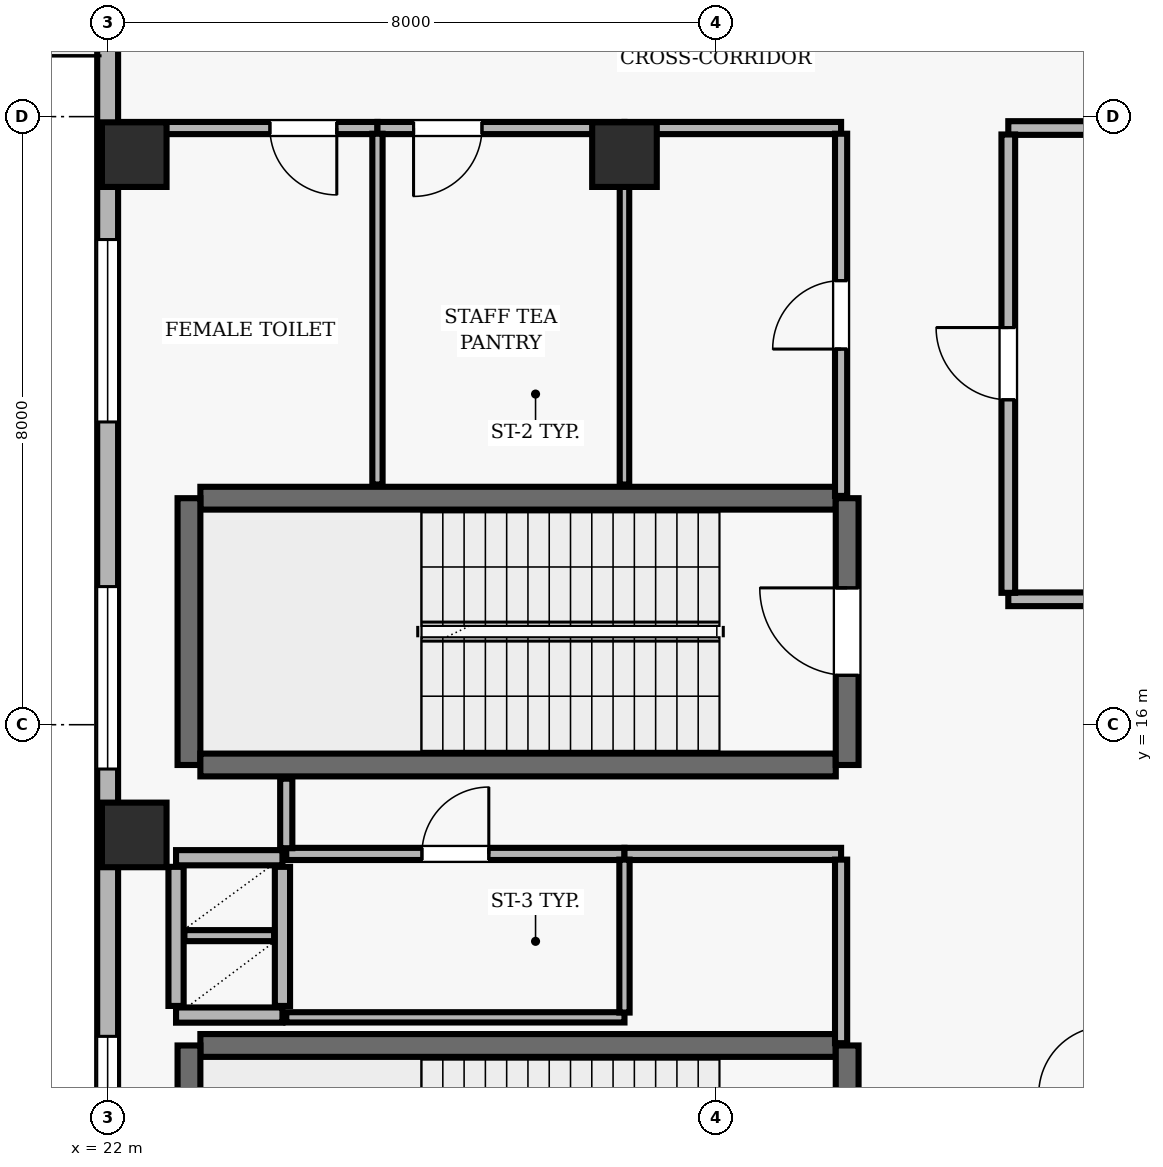
"""IFC4 building model, lengths in metres.
Left out: names, types, materials, properties, quantities, classifications, styles, units other than length and angle.
Written with IfcOpenShell. Run it as: python <this file> out.ifc"""

import sys

from ifc_helpers import new_model, si_unit, direction, frame, frame_2d, origin, origin_2d, place, context, subcontext, project, spatial, rectangle, extrude, element, fill, save


model = new_model("IFC4")
c1 = context("Model", 3, precision=1e-05, world=origin(), true_north=direction((0.0, 1.0)))
c2 = subcontext(c1, "Body", "Model", "MODEL_VIEW")
j1 = project(units=[si_unit("LENGTHUNIT", "METRE"), si_unit("PLANEANGLEUNIT", "RADIAN")], contexts=[c1])
p1 = place(None, origin())
s1 = spatial("IfcSite", under=j1, at=p1, CompositionType="ELEMENT")
p2 = place(p1, origin())
s2 = spatial("IfcBuilding", under=s1, at=p2, CompositionType="ELEMENT")
p3 = place(p2, frame((0.0, 0.0, 311.7)))
s3 = spatial("IfcBuildingStorey", under=s2, at=p3, CompositionType="ELEMENT", Elevation=311.7)
for number, where, z_axis, x_axis in (
    (1, (22.35, 14.55, 0.0), (0.0, 0.0, 1.0), (1.0, 0.0, 0.0)),
    (2, (22.35, 23.5, 0.0), (0.0, 0.0, 1.0), (1.0, 0.0, 0.0)),
    (3, (28.8, 23.5, 0.0), (0.0, 0.0, 1.0), (1.0, 0.0, 0.0)),
):
    element("IfcColumn", number, at=place(p3, frame(where, z_axis=z_axis, x_axis=x_axis)), inside=s3, PredefinedType="COLUMN", context=c2, shape_type="SweptSolid", body=[
        extrude(rectangle(XDim=0.85, YDim=0.85, at=origin_2d()), origin(), (0.0, 0.0, 1.0), 5.0),
    ])
p4 = place(p3, frame((22.0, 35.3, 0.0), z_axis=(0.0, 0.0, 1.0), x_axis=(0.0, -1.0, 0.0)))
e4 = element("IfcWall", 4, at=p4, inside=s3, PredefinedType="SOLIDWALL", context=c2, shape_type="SweptSolid", body=[
    extrude(rectangle(XDim=32.8, YDim=0.275, at=frame_2d((16.4, 0.0))), origin(), (0.0, 0.0, 1.0), 4.74),
])
p5 = place(p4, frame((7.3, 0.0, 0.0)))
e5 = element("IfcOpeningElement", 5, at=p5, cuts=e4, PredefinedType="OPENING", context=c2, shape_type="SweptSolid", body=[
    extrude(rectangle(XDim=1.0, YDim=2.2, at=frame_2d((0.5, 1.1))), frame((0.0, 0.147, 0.0), z_axis=(0.0, -1.0, 0.0), x_axis=(1.0, 0.0, 0.0)), (0.0, 0.0, 1.0), 0.295),
])
p6 = place(p4, frame((1.533, 0.0, 0.9)))
e6 = element("IfcOpeningElement", 6, at=p6, cuts=e4, PredefinedType="OPENING", context=c2, shape_type="SweptSolid", body=[
    extrude(rectangle(XDim=2.4, YDim=1.6, at=frame_2d((1.2, 0.8))), frame((0.0, 0.147, 0.0), z_axis=(0.0, -1.0, 0.0), x_axis=(1.0, 0.0, 0.0)), (0.0, 0.0, 1.0), 0.295),
])
p7 = place(p4, frame((12.917, 0.0, 0.9)))
e7 = element("IfcOpeningElement", 7, at=p7, cuts=e4, PredefinedType="OPENING", context=c2, shape_type="SweptSolid", body=[
    extrude(rectangle(XDim=2.4, YDim=1.6, at=frame_2d((1.2, 0.8))), frame((0.0, 0.147, 0.0), z_axis=(0.0, -1.0, 0.0), x_axis=(1.0, 0.0, 0.0)), (0.0, 0.0, 1.0), 0.295),
])
p8 = place(p4, frame((17.483, 0.0, 0.9)))
e8 = element("IfcOpeningElement", 8, at=p8, cuts=e4, PredefinedType="OPENING", context=c2, shape_type="SweptSolid", body=[
    extrude(rectangle(XDim=2.4, YDim=1.6, at=frame_2d((1.2, 0.8))), frame((0.0, 0.147, 0.0), z_axis=(0.0, -1.0, 0.0), x_axis=(1.0, 0.0, 0.0)), (0.0, 0.0, 1.0), 0.295),
])
p9 = place(p4, frame((23.4, 0.0, 0.9)))
e9 = element("IfcOpeningElement", 9, at=p9, cuts=e4, PredefinedType="OPENING", context=c2, shape_type="SweptSolid", body=[
    extrude(rectangle(XDim=2.4, YDim=1.6, at=frame_2d((1.2, 0.8))), frame((0.0, 0.147, 0.0), z_axis=(0.0, -1.0, 0.0), x_axis=(1.0, 0.0, 0.0)), (0.0, 0.0, 1.0), 0.295),
])
p10 = place(p3, frame((31.58, 18.98, 0.0), z_axis=(0.0, 0.0, 1.0), x_axis=(-1.0, 0.0, 0.0)))
e10 = element("IfcWall", 10, at=p10, inside=s3, PredefinedType="SHEAR", context=c2, shape_type="SweptSolid", body=[
    extrude(rectangle(XDim=8.36, YDim=0.3, at=frame_2d((4.18, 0.0))), origin(), (0.0, 0.0, 1.0), 4.74),
])
p11 = place(p3, frame((23.07, 18.98, 0.0), z_axis=(0.0, 0.0, 1.0), x_axis=(0.0, -1.0, 0.0)))
e11 = element("IfcWall", 11, at=p11, inside=s3, PredefinedType="SHEAR", context=c2, shape_type="SweptSolid", body=[
    extrude(rectangle(XDim=3.51, YDim=0.3, at=frame_2d((1.755, 0.0))), origin(), (0.0, 0.0, 1.0), 4.74),
])
p12 = place(p3, frame((23.22, 15.47, 0.0), z_axis=(0.0, 0.0, 1.0), x_axis=(1.0, 0.0, 0.0)))
e12 = element("IfcWall", 12, at=p12, inside=s3, PredefinedType="SHEAR", context=c2, shape_type="SweptSolid", body=[
    extrude(rectangle(XDim=8.36, YDim=0.3, at=frame_2d((4.18, 0.0))), origin(), (0.0, 0.0, 1.0), 4.74),
])
p13 = place(p3, frame((31.73, 15.47, 0.0), z_axis=(0.0, 0.0, 1.0), x_axis=(0.0, 1.0, 0.0)))
e13 = element("IfcWall", 13, at=p13, inside=s3, PredefinedType="SHEAR", context=c2, shape_type="SweptSolid", body=[
    extrude(rectangle(XDim=3.51, YDim=0.3, at=frame_2d((1.755, 0.0))), origin(), (0.0, 0.0, 1.0), 4.74),
])
p14 = place(p13, frame((1.18, 0.0, 0.0)))
e14 = element("IfcOpeningElement", 14, at=p14, cuts=e13, PredefinedType="OPENING", context=c2, shape_type="SweptSolid", body=[
    extrude(rectangle(XDim=1.15, YDim=2.15, at=frame_2d((0.575, 1.075))), frame((0.0, 0.16, 0.0), z_axis=(0.0, -1.0, 0.0), x_axis=(1.0, 0.0, 0.0)), (0.0, 0.0, 1.0), 0.32),
])
p15 = place(p3, frame((31.58, 11.78, 0.0), z_axis=(0.0, 0.0, 1.0), x_axis=(-1.0, 0.0, 0.0)))
e15 = element("IfcWall", 15, at=p15, inside=s3, PredefinedType="SHEAR", context=c2, shape_type="SweptSolid", body=[
    extrude(rectangle(XDim=8.36, YDim=0.3, at=frame_2d((4.18, 0.0))), origin(), (0.0, 0.0, 1.0), 4.74),
])
p16 = place(p3, frame((23.07, 11.78, 0.0), z_axis=(0.0, 0.0, 1.0), x_axis=(0.0, -1.0, 0.0)))
e16 = element("IfcWall", 16, at=p16, inside=s3, PredefinedType="SHEAR", context=c2, shape_type="SweptSolid", body=[
    extrude(rectangle(XDim=3.51, YDim=0.3, at=frame_2d((1.755, 0.0))), origin(), (0.0, 0.0, 1.0), 4.74),
])
p17 = place(p3, frame((31.73, 8.27, 0.0), z_axis=(0.0, 0.0, 1.0), x_axis=(0.0, 1.0, 0.0)))
e17 = element("IfcWall", 17, at=p17, inside=s3, PredefinedType="SHEAR", context=c2, shape_type="SweptSolid", body=[
    extrude(rectangle(XDim=3.51, YDim=0.3, at=frame_2d((1.755, 0.0))), origin(), (0.0, 0.0, 1.0), 4.74),
])
p18 = place(p17, frame((1.18, 0.0, 0.0)))
e18 = element("IfcOpeningElement", 18, at=p18, cuts=e17, PredefinedType="OPENING", context=c2, shape_type="SweptSolid", body=[
    extrude(rectangle(XDim=1.15, YDim=2.15, at=frame_2d((0.575, 1.075))), frame((0.0, 0.16, 0.0), z_axis=(0.0, -1.0, 0.0), x_axis=(1.0, 0.0, 0.0)), (0.0, 0.0, 1.0), 0.32),
])
for number, where, z_axis, x_axis in (
    (19, (22.9, 14.25, 0.0), (0.0, 0.0, 1.0), (1.0, 0.0, 0.0)),
    (20, (22.9, 12.18, 0.0), (0.0, 0.0, 1.0), (1.0, 0.0, 0.0)),
):
    element("IfcWall", number, at=place(p3, frame(where, z_axis=z_axis, x_axis=x_axis)), inside=s3, PredefinedType="SOLIDWALL", context=c2, shape_type="SweptSolid", body=[
        extrude(rectangle(XDim=1.4, YDim=0.2, at=frame_2d((0.7, 0.0))), origin(), (0.0, 0.0, 1.0), 4.74),
    ])
for number, where, z_axis, x_axis in (
    (21, (24.3, 12.3, 0.0), (0.0, 0.0, 1.0), (0.0, 1.0, 0.0)),
    (22, (22.9, 12.3, 0.0), (0.0, 0.0, 1.0), (0.0, 1.0, 0.0)),
):
    element("IfcWall", number, at=place(p3, frame(where, z_axis=z_axis, x_axis=x_axis)), inside=s3, PredefinedType="SOLIDWALL", context=c2, shape_type="SweptSolid", body=[
        extrude(rectangle(XDim=1.83, YDim=0.2, at=frame_2d((0.915, 0.0))), origin(), (0.0, 0.0, 1.0), 4.74),
    ])
p19 = place(p3, frame((23.01, 13.225, 0.0), z_axis=(0.0, 0.0, 1.0), x_axis=(1.0, 0.0, 0.0)))
e23 = element("IfcWall", 23, at=p19, inside=s3, PredefinedType="PARTITIONING", context=c2, shape_type="SweptSolid", body=[
    extrude(rectangle(XDim=1.18, YDim=0.145, at=frame_2d((0.59, 0.0))), origin(), (0.0, 0.0, 1.0), 4.422),
])
p20 = place(p3, frame((24.35, 12.15, 0.0), z_axis=(0.0, 0.0, 1.0), x_axis=(1.0, 0.0, 0.0)))
e24 = element("IfcWall", 24, at=p20, inside=s3, PredefinedType="PARTITIONING", context=c2, shape_type="SweptSolid", body=[
    extrude(rectangle(XDim=4.45, YDim=0.135, at=frame_2d((2.225, 0.0))), origin(), (0.0, 0.0, 1.0), 4.74),
])
p21 = place(p3, frame((24.35, 14.3, 0.0), z_axis=(0.0, 0.0, 1.0), x_axis=(1.0, 0.0, 0.0)))
e25 = element("IfcWall", 25, at=p21, inside=s3, PredefinedType="PARTITIONING", context=c2, shape_type="SweptSolid", body=[
    extrude(rectangle(XDim=4.45, YDim=0.16, at=frame_2d((2.225, 0.0))), origin(), (0.0, 0.0, 1.0), 4.74),
])
p22 = place(p21, frame((1.785, 0.0, 0.0)))
e26 = element("IfcOpeningElement", 26, at=p22, cuts=e25, PredefinedType="OPENING", context=c2, shape_type="SweptSolid", body=[
    extrude(rectangle(XDim=0.88, YDim=2.1, at=frame_2d((0.44, 1.05))), frame((0.0, 0.09, 0.0), z_axis=(0.0, -1.0, 0.0), x_axis=(1.0, 0.0, 0.0)), (0.0, 0.0, 1.0), 0.18),
])
p23 = place(p3, frame((25.55, 23.85, 0.0), z_axis=(0.0, 0.0, 1.0), x_axis=(-1.0, 0.0, 0.0)))
e27 = element("IfcWall", 27, at=p23, inside=s3, PredefinedType="PARTITIONING", context=c2, shape_type="SweptSolid", body=[
    extrude(rectangle(XDim=3.35, YDim=0.16, at=frame_2d((1.675, 0.0))), origin(), (0.0, 0.0, 1.0), 4.271),
])
p24 = place(p23, frame((0.535, 0.0, 0.0)))
e28 = element("IfcOpeningElement", 28, at=p24, cuts=e27, PredefinedType="OPENING", context=c2, shape_type="SweptSolid", body=[
    extrude(rectangle(XDim=0.88, YDim=2.1, at=frame_2d((0.44, 1.05))), frame((0.0, 0.09, 0.0), z_axis=(0.0, -1.0, 0.0), x_axis=(1.0, 0.0, 0.0)), (0.0, 0.0, 1.0), 0.18),
])
p25 = place(p3, frame((28.8, 14.3, 0.0), z_axis=(0.0, 0.0, 1.0), x_axis=(1.0, 0.0, 0.0)))
e29 = element("IfcWall", 29, at=p25, inside=s3, PredefinedType="PARTITIONING", context=c2, shape_type="SweptSolid", body=[
    extrude(rectangle(XDim=2.85, YDim=0.16, at=frame_2d((1.425, 0.0))), origin(), (0.0, 0.0, 1.0), 4.74),
])
p26 = place(p3, frame((28.8, 23.85, 0.0), z_axis=(0.0, 0.0, 1.0), x_axis=(-1.0, 0.0, 0.0)))
e30 = element("IfcWall", 30, at=p26, inside=s3, PredefinedType="PARTITIONING", context=c2, shape_type="SweptSolid", body=[
    extrude(rectangle(XDim=3.25, YDim=0.16, at=frame_2d((1.625, 0.0))), origin(), (0.0, 0.0, 1.0), 4.271),
])
p27 = place(p26, frame((1.875, 0.0, 0.0)))
e31 = element("IfcOpeningElement", 31, at=p27, cuts=e30, PredefinedType="OPENING", context=c2, shape_type="SweptSolid", body=[
    extrude(rectangle(XDim=0.9, YDim=2.1, at=frame_2d((0.45, 1.05))), frame((0.0, 0.09, 0.0), z_axis=(0.0, -1.0, 0.0), x_axis=(1.0, 0.0, 0.0)), (0.0, 0.0, 1.0), 0.18),
])
p28 = place(p3, frame((31.65, 23.85, 0.0), z_axis=(0.0, 0.0, 1.0), x_axis=(-1.0, 0.0, 0.0)))
e32 = element("IfcWall", 32, at=p28, inside=s3, PredefinedType="PARTITIONING", context=c2, shape_type="SweptSolid", body=[
    extrude(rectangle(XDim=2.85, YDim=0.16, at=frame_2d((1.425, 0.0))), origin(), (0.0, 0.0, 1.0), 4.271),
])
p29 = place(p3, frame((33.85, 17.65, 0.0), z_axis=(0.0, 0.0, 1.0), x_axis=(1.0, 0.0, 0.0)))
e33 = element("IfcWall", 33, at=p29, inside=s3, PredefinedType="PARTITIONING", context=c2, shape_type="SweptSolid", body=[
    extrude(rectangle(XDim=1.3, YDim=0.18, at=frame_2d((0.65, 0.0))), origin(), (0.0, 0.0, 1.0), 4.74),
])
p30 = place(p3, frame((37.85, 23.85, 0.0), z_axis=(0.0, 0.0, 1.0), x_axis=(-1.0, 0.0, 0.0)))
e34 = element("IfcWall", 34, at=p30, inside=s3, PredefinedType="PARTITIONING", context=c2, shape_type="SweptSolid", body=[
    extrude(rectangle(XDim=4.0, YDim=0.18, at=frame_2d((2.0, 0.0))), origin(), (0.0, 0.0, 1.0), 4.271),
])
p31 = place(p3, frame((24.35, 15.29, 0.0), z_axis=(0.0, 0.0, 1.0), x_axis=(0.0, -1.0, 0.0)))
e35 = element("IfcWall", 35, at=p31, inside=s3, PredefinedType="PARTITIONING", context=c2, shape_type="SweptSolid", body=[
    extrude(rectangle(XDim=0.915, YDim=0.16, at=frame_2d((0.458, 0.0))), origin(), (0.0, 0.0, 1.0), 4.74),
])
p32 = place(p3, frame((25.55, 19.16, 0.0), z_axis=(0.0, 0.0, 1.0), x_axis=(0.0, 1.0, 0.0)))
e36 = element("IfcWall", 36, at=p32, inside=s3, PredefinedType="PARTITIONING", context=c2, shape_type="SweptSolid", body=[
    extrude(rectangle(XDim=4.615, YDim=0.135, at=frame_2d((2.308, 0.0))), origin(), (0.0, 0.0, 1.0), 4.74),
])
p33 = place(p3, frame((28.8, 12.213, 0.0), z_axis=(0.0, 0.0, 1.0), x_axis=(0.0, 1.0, 0.0)))
e37 = element("IfcWall", 37, at=p33, inside=s3, PredefinedType="PARTITIONING", context=c2, shape_type="SweptSolid", body=[
    extrude(rectangle(XDim=2.012, YDim=0.135, at=frame_2d((1.006, 0.0))), origin(), (0.0, 0.0, 1.0), 4.74),
])
p34 = place(p3, frame((28.8, 23.775, 0.0), z_axis=(0.0, 0.0, 1.0), x_axis=(0.0, -1.0, 0.0)))
e38 = element("IfcWall", 38, at=p34, inside=s3, PredefinedType="PARTITIONING", context=c2, shape_type="SweptSolid", body=[
    extrude(rectangle(XDim=4.615, YDim=0.125, at=frame_2d((2.308, 0.0))), origin(), (0.0, 0.0, 1.0), 4.74),
])
p35 = place(p3, frame((31.65, 14.225, 0.0), z_axis=(0.0, 0.0, 1.0), x_axis=(0.0, -1.0, 0.0)))
e39 = element("IfcWall", 39, at=p35, inside=s3, PredefinedType="PARTITIONING", context=c2, shape_type="SweptSolid", body=[
    extrude(rectangle(XDim=2.415, YDim=0.16, at=frame_2d((1.208, 0.0))), origin(), (0.0, 0.0, 1.0), 4.74),
])
p36 = place(p3, frame((31.65, 19.01, 0.0), z_axis=(0.0, 0.0, 1.0), x_axis=(0.0, 1.0, 0.0)))
e40 = element("IfcWall", 40, at=p36, inside=s3, PredefinedType="PARTITIONING", context=c2, shape_type="SweptSolid", body=[
    extrude(rectangle(XDim=4.765, YDim=0.16, at=frame_2d((2.382, 0.0))), origin(), (0.0, 0.0, 1.0), 4.74),
])
p37 = place(p36, frame((1.932, 0.0, 0.0)))
e41 = element("IfcOpeningElement", 41, at=p37, cuts=e40, PredefinedType="OPENING", context=c2, shape_type="SweptSolid", body=[
    extrude(rectangle(XDim=0.9, YDim=2.1, at=frame_2d((0.45, 1.05))), frame((0.0, 0.09, 0.0), z_axis=(0.0, -1.0, 0.0), x_axis=(1.0, 0.0, 0.0)), (0.0, 0.0, 1.0), 0.18),
])
p38 = place(p3, frame((33.85, 17.735, 0.0), z_axis=(0.0, 0.0, 1.0), x_axis=(0.0, 1.0, 0.0)))
e42 = element("IfcWall", 42, at=p38, inside=s3, PredefinedType="PARTITIONING", context=c2, shape_type="SweptSolid", body=[
    extrude(rectangle(XDim=6.03, YDim=0.18, at=frame_2d((3.015, 0.0))), origin(), (0.0, 0.0, 1.0), 4.74),
])
p39 = place(p38, frame((2.54, 0.0, 0.0)))
e43 = element("IfcOpeningElement", 43, at=p39, cuts=e42, PredefinedType="OPENING", context=c2, shape_type="SweptSolid", body=[
    extrude(rectangle(XDim=0.95, YDim=2.1, at=frame_2d((0.475, 1.05))), frame((0.0, 0.1, 0.0), z_axis=(0.0, -1.0, 0.0), x_axis=(1.0, 0.0, 0.0)), (0.0, 0.0, 1.0), 0.2),
])
p40 = place(p7, origin())
e44 = element("IfcWindow", 44, at=p40, inside=s3, PartitioningType="SINGLE_PANEL", PredefinedType="WINDOW", context=c2, shape_type="SweptSolid", body=[
    extrude(rectangle(XDim=2.4, YDim=1.6, at=frame_2d((1.2, 0.8))), frame((0.0, 0.03, 0.0), z_axis=(0.0, -1.0, 0.0), x_axis=(1.0, 0.0, 0.0)), (0.0, 0.0, 1.0), 0.06),
])
fill(e7, e44)
p41 = place(p8, origin())
e45 = element("IfcWindow", 45, at=p41, inside=s3, PartitioningType="SINGLE_PANEL", PredefinedType="WINDOW", context=c2, shape_type="SweptSolid", body=[
    extrude(rectangle(XDim=2.4, YDim=1.6, at=frame_2d((1.2, 0.8))), frame((0.0, 0.03, 0.0), z_axis=(0.0, -1.0, 0.0), x_axis=(1.0, 0.0, 0.0)), (0.0, 0.0, 1.0), 0.06),
])
fill(e8, e45)
p42 = place(p9, origin())
e46 = element("IfcWindow", 46, at=p42, inside=s3, PartitioningType="SINGLE_PANEL", PredefinedType="WINDOW", context=c2, shape_type="SweptSolid", body=[
    extrude(rectangle(XDim=2.4, YDim=1.6, at=frame_2d((1.2, 0.8))), frame((0.0, 0.03, 0.0), z_axis=(0.0, -1.0, 0.0), x_axis=(1.0, 0.0, 0.0)), (0.0, 0.0, 1.0), 0.06),
])
fill(e9, e46)
p43 = place(p14, origin())
e47 = element("IfcDoor", 47, at=p43, inside=s3, OperationType="SINGLE_SWING_RIGHT", PredefinedType="DOOR", context=c2, shape_type="SweptSolid", body=[
    extrude(rectangle(XDim=1.15, YDim=2.15, at=frame_2d((0.575, 1.075))), frame((0.0, 0.025, 0.0), z_axis=(0.0, -1.0, 0.0), x_axis=(1.0, 0.0, 0.0)), (0.0, 0.0, 1.0), 0.05),
])
fill(e14, e47)
p44 = place(p39, origin())
e48 = element("IfcDoor", 48, at=p44, inside=s3, OperationType="SINGLE_SWING_RIGHT", PredefinedType="DOOR", context=c2, shape_type="SweptSolid", body=[
    extrude(rectangle(XDim=0.95, YDim=2.1, at=frame_2d((0.475, 1.05))), frame((0.0, 0.025, 0.0), z_axis=(0.0, -1.0, 0.0), x_axis=(1.0, 0.0, 0.0)), (0.0, 0.0, 1.0), 0.05),
])
fill(e43, e48)
p45 = place(p37, origin())
e49 = element("IfcDoor", 49, at=p45, inside=s3, OperationType="SINGLE_SWING_LEFT", PredefinedType="DOOR", context=c2, shape_type="SweptSolid", body=[
    extrude(rectangle(XDim=0.9, YDim=2.1, at=frame_2d((0.45, 1.05))), frame((0.0, 0.025, 0.0), z_axis=(0.0, -1.0, 0.0), x_axis=(1.0, 0.0, 0.0)), (0.0, 0.0, 1.0), 0.05),
])
fill(e41, e49)
p46 = place(p22, origin())
e50 = element("IfcDoor", 50, at=p46, inside=s3, OperationType="SINGLE_SWING_RIGHT", PredefinedType="DOOR", context=c2, shape_type="SweptSolid", body=[
    extrude(rectangle(XDim=0.88, YDim=2.1, at=frame_2d((0.44, 1.05))), frame((0.0, 0.025, 0.0), z_axis=(0.0, -1.0, 0.0), x_axis=(1.0, 0.0, 0.0)), (0.0, 0.0, 1.0), 0.05),
])
fill(e26, e50)
p47 = place(p24, origin())
e51 = element("IfcDoor", 51, at=p47, inside=s3, OperationType="SINGLE_SWING_LEFT", PredefinedType="DOOR", context=c2, shape_type="SweptSolid", body=[
    extrude(rectangle(XDim=0.88, YDim=2.1, at=frame_2d((0.44, 1.05))), frame((0.0, 0.025, 0.0), z_axis=(0.0, -1.0, 0.0), x_axis=(1.0, 0.0, 0.0)), (0.0, 0.0, 1.0), 0.05),
])
fill(e28, e51)
p48 = place(p27, origin())
e52 = element("IfcDoor", 52, at=p48, inside=s3, OperationType="SINGLE_SWING_RIGHT", PredefinedType="DOOR", context=c2, shape_type="SweptSolid", body=[
    extrude(rectangle(XDim=0.9, YDim=2.1, at=frame_2d((0.45, 1.05))), frame((0.0, 0.025, 0.0), z_axis=(0.0, -1.0, 0.0), x_axis=(1.0, 0.0, 0.0)), (0.0, 0.0, 1.0), 0.05),
])
fill(e31, e52)
save(model, sys.argv[1])
